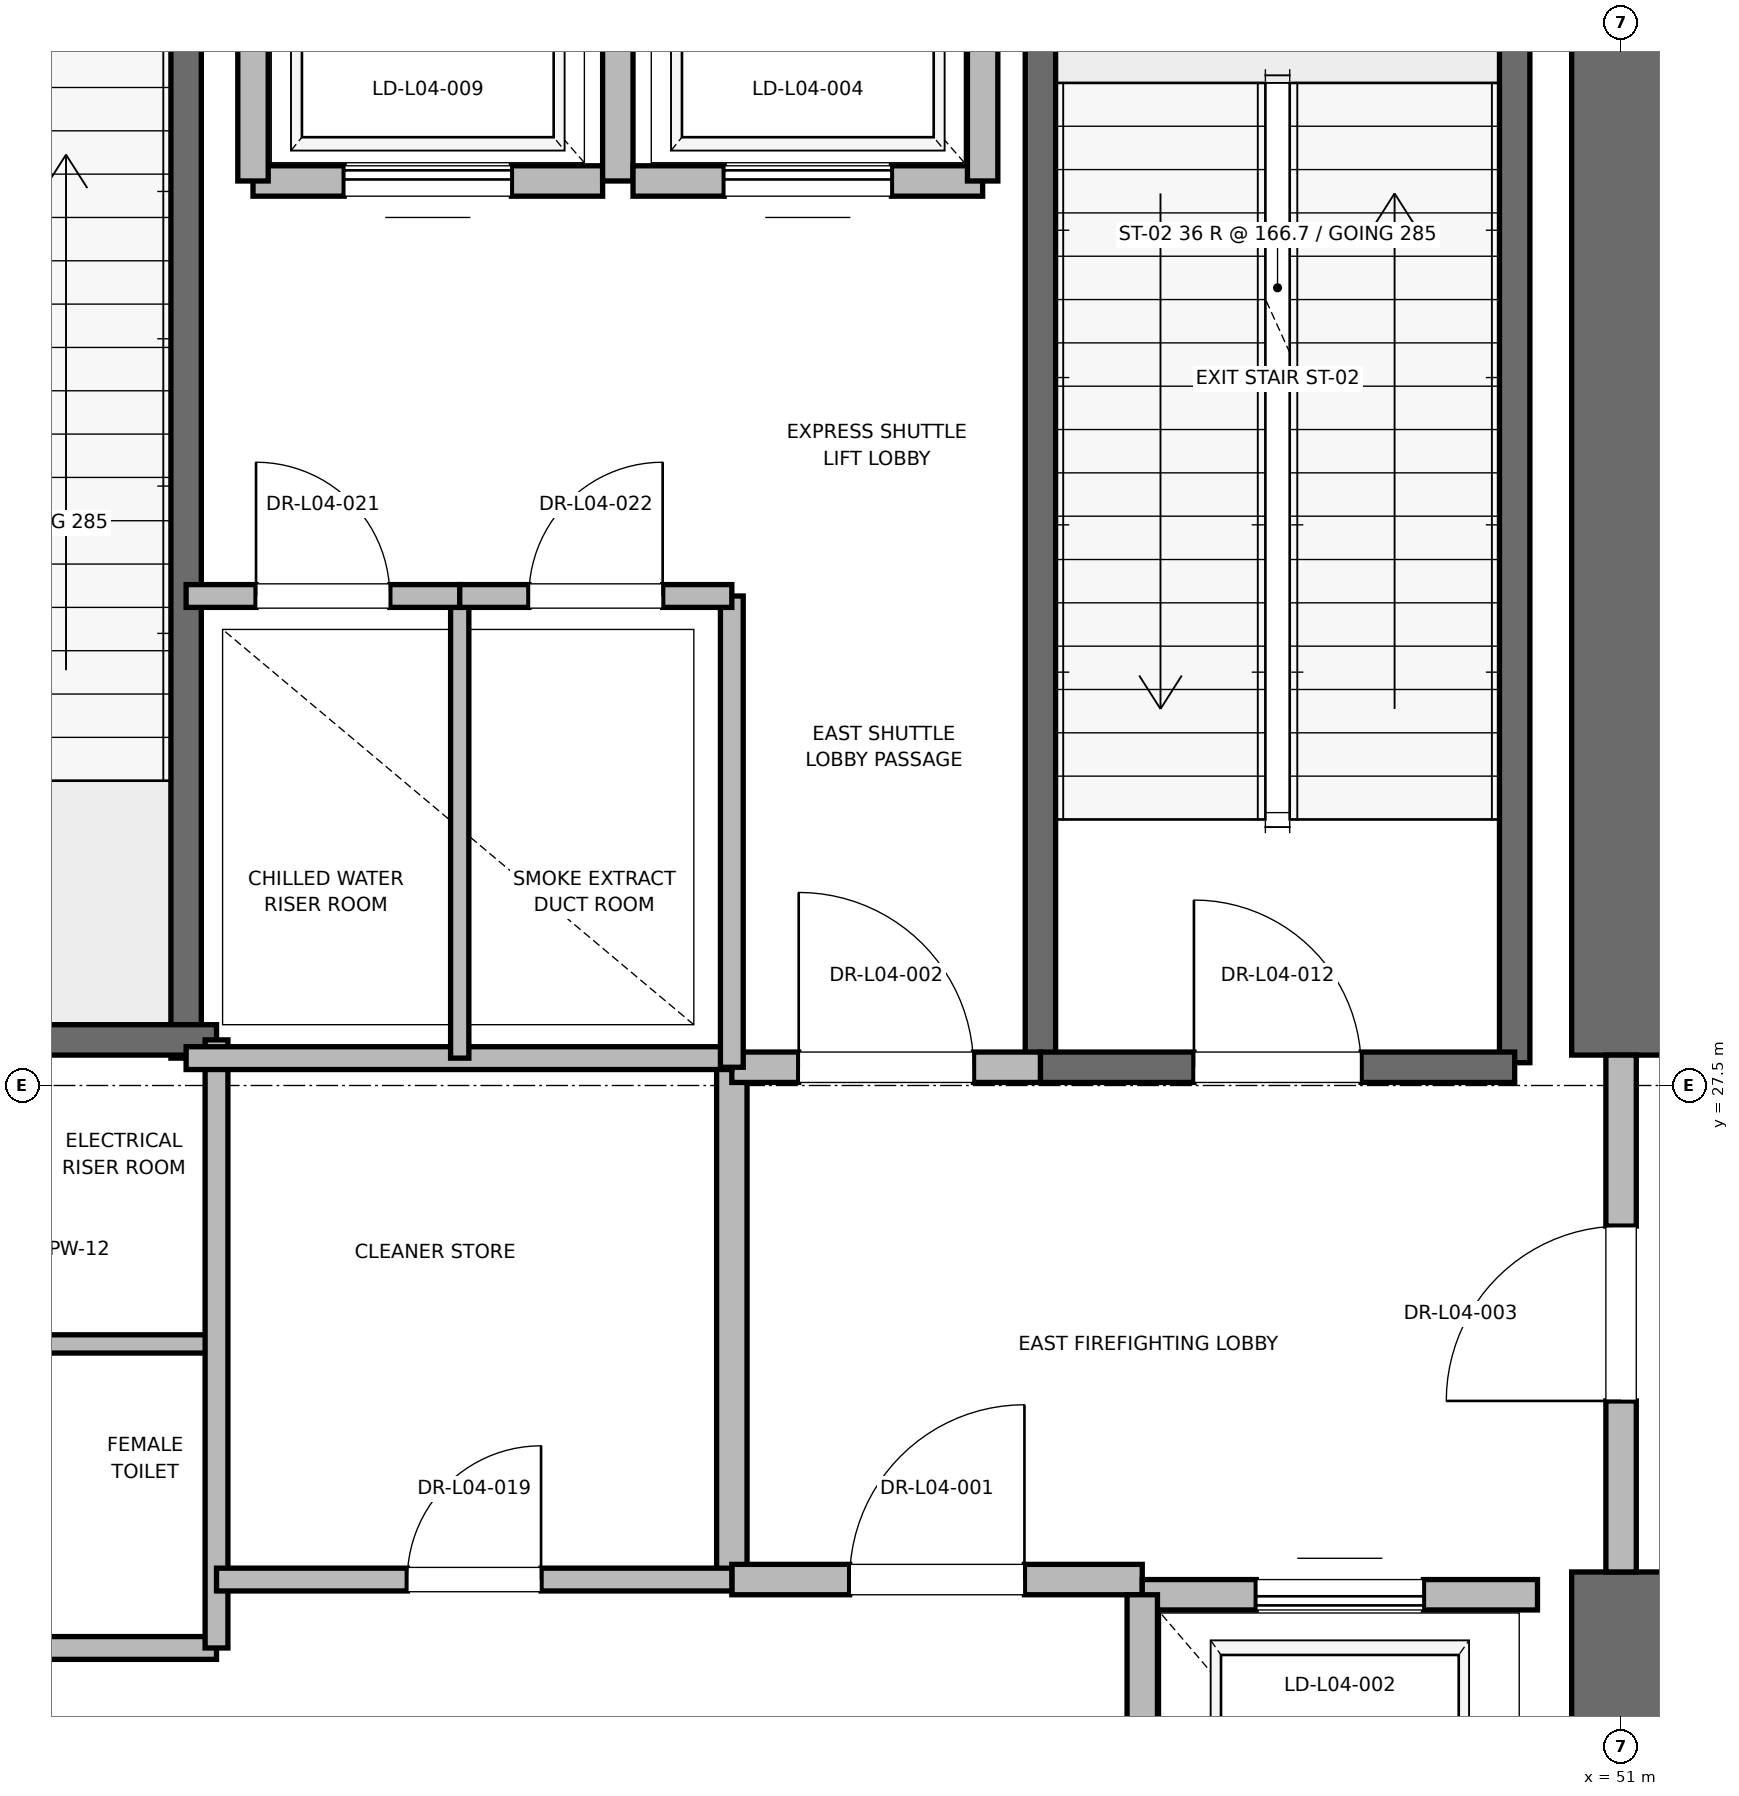
"""IFC4 building model, lengths in metres.
Left out: names, types, materials, properties, quantities, classifications, styles, units other than length and angle.
Written with IfcOpenShell. Run it as: python <this file> out.ifc"""

import sys

from ifc_helpers import new_model, si_unit, direction, frame, frame_2d, origin, place, context, subcontext, project, spatial, rectangle, extrude, element, fill, save


model = new_model("IFC4")
c1 = context("Model", 3, precision=1e-05, world=origin(), true_north=direction((0.0, 1.0)))
c2 = subcontext(c1, "Body", "Model", "MODEL_VIEW")
j1 = project(units=[si_unit("LENGTHUNIT", "METRE"), si_unit("PLANEANGLEUNIT", "RADIAN")], contexts=[c1])
p1 = place(None, origin())
s1 = spatial("IfcSite", under=j1, at=p1, CompositionType="ELEMENT")
p2 = place(p1, origin())
s2 = spatial("IfcBuilding", under=s1, at=p2, CompositionType="ELEMENT")
p3 = place(p2, frame((0.0, 0.0, 21.6)))
s3 = spatial("IfcBuildingStorey", under=s2, at=p3, CompositionType="ELEMENT", Elevation=21.6)
p4 = place(p3, frame((51.0, 18.5, 0.0), z_axis=(0.0, 0.0, 1.0), x_axis=(0.0, 1.0, 0.0)))
e1 = element("IfcWall", 1, at=p4, inside=s3, PredefinedType="SHEAR", context=c2, shape_type="SweptSolid", body=[
    extrude(rectangle(XDim=5.8, YDim=0.65, at=frame_2d((2.9, 0.0))), origin(), (0.0, 0.0, 1.0), 5.76),
])
p5 = place(p3, frame((51.0, 27.7, 0.0), z_axis=(0.0, 0.0, 1.0), x_axis=(0.0, 1.0, 0.0)))
e2 = element("IfcWall", 2, at=p5, inside=s3, PredefinedType="SHEAR", context=c2, shape_type="SweptSolid", body=[
    extrude(rectangle(XDim=8.8, YDim=0.65, at=frame_2d((4.4, 0.0))), origin(), (0.0, 0.0, 1.0), 5.76),
])
p6 = place(p3, frame((50.3, 27.65, 0.0), z_axis=(0.0, 0.0, 1.0), x_axis=(0.0, 1.0, 0.0)))
e3 = element("IfcWall", 3, at=p6, inside=s3, PredefinedType="SOLIDWALL", context=c2, shape_type="SweptSolid", body=[
    extrude(rectangle(XDim=8.15, YDim=0.2, at=frame_2d((4.075, 0.0))), origin(), (0.0, 0.0, 1.0), 5.76),
])
p7 = place(p3, frame((47.18, 27.62, 0.0), z_axis=(0.0, 0.0, 1.0), x_axis=(0.0, 1.0, 0.0)))
e4 = element("IfcWall", 4, at=p7, inside=s3, PredefinedType="SOLIDWALL", context=c2, shape_type="SweptSolid", body=[
    extrude(rectangle(XDim=8.18, YDim=0.2, at=frame_2d((4.09, 0.0))), origin(), (0.0, 0.0, 1.0), 5.76),
])
p8 = place(p3, frame((47.18, 27.62, 0.0), z_axis=(0.0, 0.0, 1.0), x_axis=(1.0, 0.0, 0.0)))
e5 = element("IfcWall", 5, at=p8, inside=s3, PredefinedType="SOLIDWALL", context=c2, shape_type="SweptSolid", body=[
    extrude(rectangle(XDim=3.12, YDim=0.2, at=frame_2d((1.56, 0.0))), origin(), (0.0, 0.0, 1.0), 5.76),
])
p9 = place(p8, frame((1.01, 0.0, 0.0)))
e6 = element("IfcOpeningElement", 6, at=p9, cuts=e5, PredefinedType="OPENING", context=c2, shape_type="SweptSolid", body=[
    extrude(rectangle(XDim=1.1, YDim=2.15, at=frame_2d((0.55, 1.075))), frame((0.0, 0.1, 0.0), z_axis=(0.0, -1.0, 0.0), x_axis=(1.0, 0.0, 0.0)), (0.0, 0.0, 1.0), 0.2),
])
p10 = place(p3, frame((41.56, 27.68, 0.0), z_axis=(0.0, 0.0, 1.0), x_axis=(0.0, 1.0, 0.0)))
e7 = element("IfcWall", 7, at=p10, inside=s3, PredefinedType="SOLIDWALL", context=c2, shape_type="SweptSolid", body=[
    extrude(rectangle(XDim=8.57, YDim=0.2, at=frame_2d((4.285, 0.0))), origin(), (0.0, 0.0, 1.0), 5.76),
])
p11 = place(p3, frame((38.44, 27.8, 0.0), z_axis=(0.0, 0.0, 1.0), x_axis=(1.0, 0.0, 0.0)))
e8 = element("IfcWall", 8, at=p11, inside=s3, PredefinedType="SOLIDWALL", context=c2, shape_type="SweptSolid", body=[
    extrude(rectangle(XDim=3.32, YDim=0.2, at=frame_2d((1.66, 0.0))), origin(), (0.0, 0.0, 1.0), 5.76),
])
p12 = place(p3, frame((45.15, 24.25, 0.0), z_axis=(0.0, 0.0, 1.0), x_axis=(0.0, 1.0, 0.0)))
e9 = element("IfcWall", 9, at=p12, inside=s3, PredefinedType="PARTITIONING", context=c2, shape_type="SweptSolid", body=[
    extrude(rectangle(XDim=3.37, YDim=0.2, at=frame_2d((1.685, 0.0))), origin(), (0.0, 0.0, 1.0), 5.76),
])
p13 = place(p3, frame((45.15, 24.25, 0.0), z_axis=(0.0, 0.0, 1.0), x_axis=(1.0, 0.0, 0.0)))
e10 = element("IfcWall", 10, at=p13, inside=s3, PredefinedType="PARTITIONING", context=c2, shape_type="SweptSolid", body=[
    extrude(rectangle(XDim=2.7, YDim=0.2, at=frame_2d((1.35, 0.0))), origin(), (0.0, 0.0, 1.0), 5.76),
])
p14 = place(p13, frame((0.775, 0.0, 0.0)))
e11 = element("IfcOpeningElement", 11, at=p14, cuts=e10, PredefinedType="OPENING", context=c2, shape_type="SweptSolid", body=[
    extrude(rectangle(XDim=1.15, YDim=2.2, at=frame_2d((0.575, 1.1))), frame((0.0, 0.1, 0.0), z_axis=(0.0, -1.0, 0.0), x_axis=(1.0, 0.0, 0.0)), (0.0, 0.0, 1.0), 0.2),
])
p15 = place(p3, frame((45.15, 27.62, 0.0), z_axis=(0.0, 0.0, 1.0), x_axis=(1.0, 0.0, 0.0)))
e12 = element("IfcWall", 12, at=p15, inside=s3, PredefinedType="PARTITIONING", context=c2, shape_type="SweptSolid", body=[
    extrude(rectangle(XDim=2.03, YDim=0.2, at=frame_2d((1.015, 0.0))), origin(), (0.0, 0.0, 1.0), 5.76),
])
p16 = place(p15, frame((0.44, 0.0, 0.0)))
e13 = element("IfcOpeningElement", 13, at=p16, cuts=e12, PredefinedType="OPENING", context=c2, shape_type="SweptSolid", body=[
    extrude(rectangle(XDim=1.15, YDim=2.2, at=frame_2d((0.575, 1.1))), frame((0.0, 0.1, 0.0), z_axis=(0.0, -1.0, 0.0), x_axis=(1.0, 0.0, 0.0)), (0.0, 0.0, 1.0), 0.2),
])
p17 = place(p3, frame((51.0, 24.3, 0.0), z_axis=(0.0, 0.0, 1.0), x_axis=(0.0, 1.0, 0.0)))
e14 = element("IfcWall", 14, at=p17, inside=s3, PredefinedType="PARTITIONING", context=c2, shape_type="SweptSolid", body=[
    extrude(rectangle(XDim=3.4, YDim=0.2, at=frame_2d((1.7, 0.0))), origin(), (0.0, 0.0, 1.0), 4.54),
])
p18 = place(p17, frame((1.125, 0.0, 0.0)))
e15 = element("IfcOpeningElement", 15, at=p18, cuts=e14, PredefinedType="OPENING", context=c2, shape_type="SweptSolid", body=[
    extrude(rectangle(XDim=1.15, YDim=2.2, at=frame_2d((0.575, 1.1))), frame((0.0, 0.1, 0.0), z_axis=(0.0, -1.0, 0.0), x_axis=(1.0, 0.0, 0.0)), (0.0, 0.0, 1.0), 0.2),
])
p19 = place(p3, frame((50.45, 24.15, 0.0), z_axis=(0.0, 0.0, 1.0), x_axis=(-1.0, 0.0, 0.0)))
e16 = element("IfcWall", 16, at=p19, inside=s3, PredefinedType="SOLIDWALL", context=c2, shape_type="SweptSolid", body=[
    extrude(rectangle(XDim=2.6, YDim=0.2, at=frame_2d((1.3, 0.0))), origin(), (0.0, 0.0, 1.0), 4.54),
])
p20 = place(p19, frame((0.75, 0.0, 0.0)))
e17 = element("IfcOpeningElement", 17, at=p20, cuts=e16, PredefinedType="OPENING", context=c2, shape_type="SweptSolid", body=[
    extrude(rectangle(XDim=1.1, YDim=2.2, at=frame_2d((0.55, 1.1))), frame((0.0, 0.1, 0.0), z_axis=(0.0, -1.0, 0.0), x_axis=(1.0, 0.0, 0.0)), (0.0, 0.0, 1.0), 0.2),
])
p21 = place(p3, frame((47.85, 24.15, 0.0), z_axis=(0.0, 0.0, 1.0), x_axis=(0.0, -1.0, 0.0)))
e18 = element("IfcWall", 18, at=p21, inside=s3, PredefinedType="SOLIDWALL", context=c2, shape_type="SweptSolid", body=[
    extrude(rectangle(XDim=3.0, YDim=0.2, at=frame_2d((1.5, 0.0))), origin(), (0.0, 0.0, 1.0), 5.76),
])
p22 = place(p3, frame((42.0, 33.45, 0.0), z_axis=(0.0, 0.0, 1.0), x_axis=(1.0, 0.0, 0.0)))
e19 = element("IfcWall", 19, at=p22, inside=s3, PredefinedType="SOLIDWALL", context=c2, shape_type="SweptSolid", body=[
    extrude(rectangle(XDim=2.3, YDim=0.2, at=frame_2d((1.15, 0.0))), origin(), (0.0, 0.0, 1.0), 5.76),
])
p23 = place(p22, frame((0.6, 0.0, 0.0)))
e20 = element("IfcOpeningElement", 20, at=p23, cuts=e19, PredefinedType="OPENING", context=c2, shape_type="SweptSolid", body=[
    extrude(rectangle(XDim=1.1, YDim=2.2, at=frame_2d((0.55, 1.1))), frame((0.0, 0.1, 0.0), z_axis=(0.0, -1.0, 0.0), x_axis=(1.0, 0.0, 0.0)), (0.0, 0.0, 1.0), 0.2),
])
for number, where, z_axis, x_axis in (
    (21, (42.0, 36.05, 0.0), (0.0, 0.0, 1.0), (0.0, -1.0, 0.0)),
    (22, (44.4, 33.45, 0.0), (0.0, 0.0, 1.0), (0.0, 1.0, 0.0)),
):
    element("IfcWall", number, at=place(p3, frame(where, z_axis=z_axis, x_axis=x_axis)), inside=s3, PredefinedType="SOLIDWALL", context=c2, shape_type="SweptSolid", body=[
        extrude(rectangle(XDim=2.6, YDim=0.2, at=frame_2d((1.3, 0.0))), origin(), (0.0, 0.0, 1.0), 4.54),
    ])
p24 = place(p3, frame((44.5, 33.45, 0.0), z_axis=(0.0, 0.0, 1.0), x_axis=(1.0, 0.0, 0.0)))
e23 = element("IfcWall", 23, at=p24, inside=s3, PredefinedType="SOLIDWALL", context=c2, shape_type="SweptSolid", body=[
    extrude(rectangle(XDim=2.3, YDim=0.2, at=frame_2d((1.15, 0.0))), origin(), (0.0, 0.0, 1.0), 5.76),
])
p25 = place(p24, frame((0.6, 0.0, 0.0)))
e24 = element("IfcOpeningElement", 24, at=p25, cuts=e23, PredefinedType="OPENING", context=c2, shape_type="SweptSolid", body=[
    extrude(rectangle(XDim=1.1, YDim=2.2, at=frame_2d((0.55, 1.1))), frame((0.0, 0.1, 0.0), z_axis=(0.0, -1.0, 0.0), x_axis=(1.0, 0.0, 0.0)), (0.0, 0.0, 1.0), 0.2),
])
p26 = place(p3, frame((46.8, 33.45, 0.0), z_axis=(0.0, 0.0, 1.0), x_axis=(0.0, 1.0, 0.0)))
e25 = element("IfcWall", 25, at=p26, inside=s3, PredefinedType="SOLIDWALL", context=c2, shape_type="SweptSolid", body=[
    extrude(rectangle(XDim=2.6, YDim=0.2, at=frame_2d((1.3, 0.0))), origin(), (0.0, 0.0, 1.0), 5.76),
])
p27 = place(p3, frame((39.95, 23.8, 0.0), z_axis=(0.0, 0.0, 1.0), x_axis=(1.0, 0.0, 0.0)))
e26 = element("IfcWall", 26, at=p27, inside=s3, PredefinedType="PARTITIONING", context=c2, shape_type="SweptSolid", body=[
    extrude(rectangle(XDim=1.81, YDim=0.15, at=frame_2d((0.905, 0.0))), origin(), (0.0, 0.0, 1.0), 2.85),
])
p28 = place(p3, frame((39.95, 25.8, 0.0), z_axis=(0.0, 0.0, 1.0), x_axis=(1.0, 0.0, 0.0)))
e27 = element("IfcWall", 27, at=p28, inside=s3, PredefinedType="PARTITIONING", context=c2, shape_type="SweptSolid", body=[
    extrude(rectangle(XDim=1.81, YDim=0.12, at=frame_2d((0.905, 0.0))), origin(), (0.0, 0.0, 1.0), 2.85),
])
p29 = place(p3, frame((41.76, 23.8, 0.0), z_axis=(0.0, 0.0, 1.0), x_axis=(0.0, 1.0, 0.0)))
e28 = element("IfcWall", 28, at=p29, inside=s3, PredefinedType="PARTITIONING", context=c2, shape_type="SweptSolid", body=[
    extrude(rectangle(XDim=4.0, YDim=0.15, at=frame_2d((2.0, 0.0))), origin(), (0.0, 0.0, 1.0), 2.85),
])
p30 = place(p3, frame((41.56, 27.68, 0.0), z_axis=(0.0, 0.0, 1.0), x_axis=(1.0, 0.0, 0.0)))
e29 = element("IfcWall", 29, at=p30, inside=s3, PredefinedType="PARTITIONING", context=c2, shape_type="SweptSolid", body=[
    extrude(rectangle(XDim=3.59, YDim=0.15, at=frame_2d((1.795, 0.0))), origin(), (0.0, 0.0, 1.0), 2.85),
])
p31 = place(p3, frame((41.76, 24.25, 0.0), z_axis=(0.0, 0.0, 1.0), x_axis=(1.0, 0.0, 0.0)))
e30 = element("IfcWall", 30, at=p31, inside=s3, PredefinedType="PARTITIONING", context=c2, shape_type="SweptSolid", body=[
    extrude(rectangle(XDim=3.39, YDim=0.15, at=frame_2d((1.695, 0.0))), origin(), (0.0, 0.0, 1.0), 2.85),
])
p32 = place(p31, frame((1.255, 0.0, 0.0)))
e31 = element("IfcOpeningElement", 31, at=p32, cuts=e30, PredefinedType="OPENING", context=c2, shape_type="SweptSolid", body=[
    extrude(rectangle(XDim=0.88, YDim=2.1, at=frame_2d((0.44, 1.05))), frame((0.0, 0.075, 0.0), z_axis=(0.0, -1.0, 0.0), x_axis=(1.0, 0.0, 0.0)), (0.0, 0.0, 1.0), 0.15),
])
p33 = place(p3, frame((45.15, 27.62, 0.0), z_axis=(0.0, 0.0, 1.0), x_axis=(0.0, 1.0, 0.0)))
e32 = element("IfcWall", 32, at=p33, inside=s3, PredefinedType="PARTITIONING", context=c2, shape_type="SweptSolid", body=[
    extrude(rectangle(XDim=3.1, YDim=0.15, at=frame_2d((1.55, 0.0))), origin(), (0.0, 0.0, 1.0), 2.85),
])
p34 = place(p3, frame((43.36, 27.68, 0.0), z_axis=(0.0, 0.0, 1.0), x_axis=(0.0, 1.0, 0.0)))
e33 = element("IfcWall", 33, at=p34, inside=s3, PredefinedType="PARTITIONING", context=c2, shape_type="SweptSolid", body=[
    extrude(rectangle(XDim=3.04, YDim=0.12, at=frame_2d((1.52, 0.0))), origin(), (0.0, 0.0, 1.0), 2.85),
])
p35 = place(p3, frame((41.56, 30.72, 0.0), z_axis=(0.0, 0.0, 1.0), x_axis=(1.0, 0.0, 0.0)))
e34 = element("IfcWall", 34, at=p35, inside=s3, PredefinedType="PARTITIONING", context=c2, shape_type="SweptSolid", body=[
    extrude(rectangle(XDim=1.8, YDim=0.15, at=frame_2d((0.9, 0.0))), origin(), (0.0, 0.0, 1.0), 2.85),
])
p36 = place(p35, frame((0.46, 0.0, 0.0)))
e35 = element("IfcOpeningElement", 35, at=p36, cuts=e34, PredefinedType="OPENING", context=c2, shape_type="SweptSolid", body=[
    extrude(rectangle(XDim=0.88, YDim=2.1, at=frame_2d((0.44, 1.05))), frame((0.0, 0.075, 0.0), z_axis=(0.0, -1.0, 0.0), x_axis=(1.0, 0.0, 0.0)), (0.0, 0.0, 1.0), 0.15),
])
p37 = place(p3, frame((43.36, 30.72, 0.0), z_axis=(0.0, 0.0, 1.0), x_axis=(1.0, 0.0, 0.0)))
e36 = element("IfcWall", 36, at=p37, inside=s3, PredefinedType="PARTITIONING", context=c2, shape_type="SweptSolid", body=[
    extrude(rectangle(XDim=1.79, YDim=0.15, at=frame_2d((0.895, 0.0))), origin(), (0.0, 0.0, 1.0), 2.85),
])
p38 = place(p37, frame((0.455, 0.0, 0.0)))
e37 = element("IfcOpeningElement", 37, at=p38, cuts=e36, PredefinedType="OPENING", context=c2, shape_type="SweptSolid", body=[
    extrude(rectangle(XDim=0.88, YDim=2.1, at=frame_2d((0.44, 1.05))), frame((0.0, 0.075, 0.0), z_axis=(0.0, -1.0, 0.0), x_axis=(1.0, 0.0, 0.0)), (0.0, 0.0, 1.0), 0.15),
])
p39 = place(p9, origin())
e38 = element("IfcDoor", 38, at=p39, inside=s3, OperationType="SINGLE_SWING_LEFT", PredefinedType="DOOR", context=c2, shape_type="SweptSolid", body=[
    extrude(rectangle(XDim=1.1, YDim=2.15, at=frame_2d((0.55, 1.075))), frame((0.0, 0.025, 0.0), z_axis=(0.0, -1.0, 0.0), x_axis=(1.0, 0.0, 0.0)), (0.0, 0.0, 1.0), 0.05),
])
fill(e6, e38)
p40 = place(p14, origin())
e39 = element("IfcDoor", 39, at=p40, inside=s3, OperationType="SINGLE_SWING_RIGHT", PredefinedType="DOOR", context=c2, shape_type="SweptSolid", body=[
    extrude(rectangle(XDim=1.15, YDim=2.2, at=frame_2d((0.575, 1.1))), frame((0.0, 0.025, 0.0), z_axis=(0.0, -1.0, 0.0), x_axis=(1.0, 0.0, 0.0)), (0.0, 0.0, 1.0), 0.05),
])
fill(e11, e39)
p41 = place(p16, origin())
e40 = element("IfcDoor", 40, at=p41, inside=s3, OperationType="SINGLE_SWING_LEFT", PredefinedType="DOOR", context=c2, shape_type="SweptSolid", body=[
    extrude(rectangle(XDim=1.15, YDim=2.2, at=frame_2d((0.575, 1.1))), frame((0.0, 0.025, 0.0), z_axis=(0.0, -1.0, 0.0), x_axis=(1.0, 0.0, 0.0)), (0.0, 0.0, 1.0), 0.05),
])
fill(e13, e40)
p42 = place(p18, origin())
e41 = element("IfcDoor", 41, at=p42, inside=s3, OperationType="SINGLE_SWING_LEFT", PredefinedType="DOOR", context=c2, shape_type="SweptSolid", body=[
    extrude(rectangle(XDim=1.15, YDim=2.2, at=frame_2d((0.575, 1.1))), frame((0.0, 0.025, 0.0), z_axis=(0.0, -1.0, 0.0), x_axis=(1.0, 0.0, 0.0)), (0.0, 0.0, 1.0), 0.05),
])
fill(e15, e41)
p43 = place(p20, origin())
e42 = element("IfcDoor", 42, at=p43, inside=s3, OperationType="SLIDING_TO_RIGHT", PredefinedType="DOOR", context=c2, shape_type="SweptSolid", body=[
    extrude(rectangle(XDim=1.1, YDim=2.2, at=frame_2d((0.55, 1.1))), frame((0.0, 0.025, 0.0), z_axis=(0.0, -1.0, 0.0), x_axis=(1.0, 0.0, 0.0)), (0.0, 0.0, 1.0), 0.05),
])
fill(e17, e42)
p44 = place(p23, origin())
e43 = element("IfcDoor", 43, at=p44, inside=s3, OperationType="SLIDING_TO_RIGHT", PredefinedType="DOOR", context=c2, shape_type="SweptSolid", body=[
    extrude(rectangle(XDim=1.1, YDim=2.2, at=frame_2d((0.55, 1.1))), frame((0.0, 0.025, 0.0), z_axis=(0.0, -1.0, 0.0), x_axis=(1.0, 0.0, 0.0)), (0.0, 0.0, 1.0), 0.05),
])
fill(e20, e43)
p45 = place(p25, origin())
e44 = element("IfcDoor", 44, at=p45, inside=s3, OperationType="SLIDING_TO_RIGHT", PredefinedType="DOOR", context=c2, shape_type="SweptSolid", body=[
    extrude(rectangle(XDim=1.1, YDim=2.2, at=frame_2d((0.55, 1.1))), frame((0.0, 0.025, 0.0), z_axis=(0.0, -1.0, 0.0), x_axis=(1.0, 0.0, 0.0)), (0.0, 0.0, 1.0), 0.05),
])
fill(e24, e44)
p46 = place(p32, origin())
e45 = element("IfcDoor", 45, at=p46, inside=s3, OperationType="SINGLE_SWING_RIGHT", PredefinedType="DOOR", context=c2, shape_type="SweptSolid", body=[
    extrude(rectangle(XDim=0.88, YDim=2.1, at=frame_2d((0.44, 1.05))), frame((0.0, 0.025, 0.0), z_axis=(0.0, -1.0, 0.0), x_axis=(1.0, 0.0, 0.0)), (0.0, 0.0, 1.0), 0.05),
])
fill(e31, e45)
p47 = place(p36, origin())
e46 = element("IfcDoor", 46, at=p47, inside=s3, OperationType="SINGLE_SWING_LEFT", PredefinedType="DOOR", context=c2, shape_type="SweptSolid", body=[
    extrude(rectangle(XDim=0.88, YDim=2.1, at=frame_2d((0.44, 1.05))), frame((0.0, 0.025, 0.0), z_axis=(0.0, -1.0, 0.0), x_axis=(1.0, 0.0, 0.0)), (0.0, 0.0, 1.0), 0.05),
])
fill(e35, e46)
p48 = place(p38, origin())
e47 = element("IfcDoor", 47, at=p48, inside=s3, OperationType="SINGLE_SWING_RIGHT", PredefinedType="DOOR", context=c2, shape_type="SweptSolid", body=[
    extrude(rectangle(XDim=0.88, YDim=2.1, at=frame_2d((0.44, 1.05))), frame((0.0, 0.025, 0.0), z_axis=(0.0, -1.0, 0.0), x_axis=(1.0, 0.0, 0.0)), (0.0, 0.0, 1.0), 0.05),
])
fill(e37, e47)
save(model, sys.argv[1])
